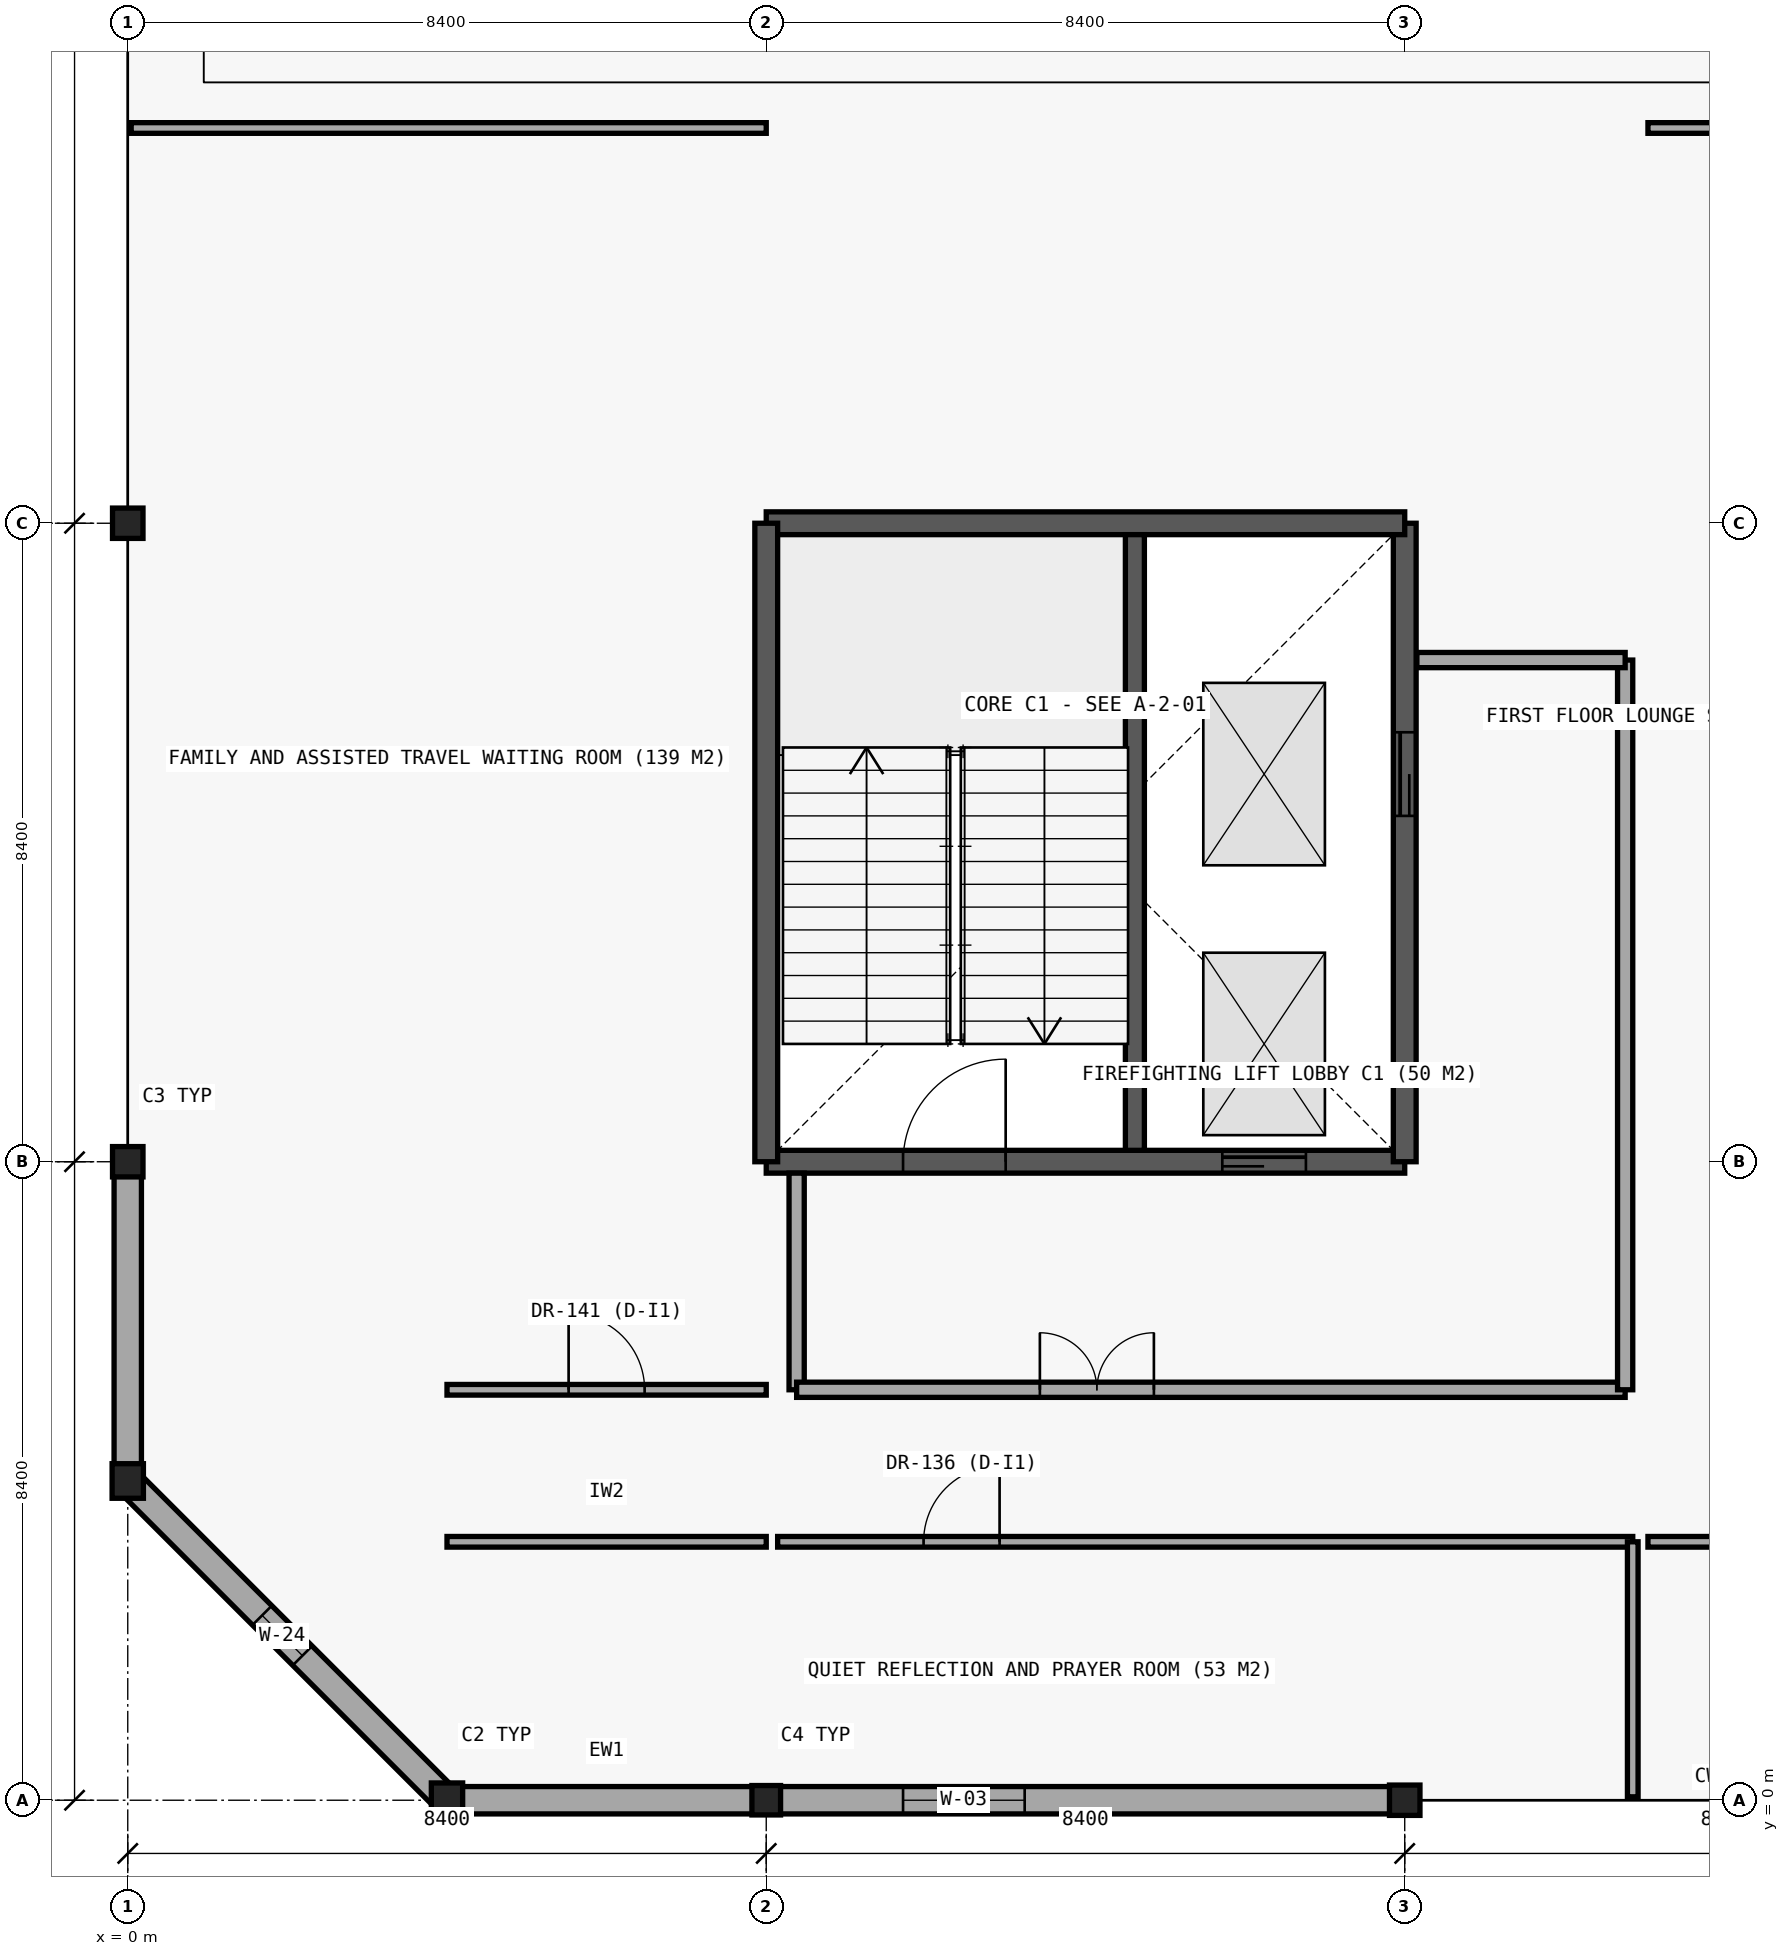
"""IFC4 building model, lengths in metres.
Left out: names, types, materials, properties, quantities, classifications, styles, units other than length and angle.
Written with IfcOpenShell. Run it as: python <this file> out.ifc"""

import sys

from ifc_helpers import new_model, si_unit, direction, frame, frame_2d, origin, origin_2d, place, context, subcontext, project, spatial, rectangle, i_section, extrude, element, fill, save


model = new_model("IFC4")
c1 = context("Model", 3, precision=1e-05, world=origin(), true_north=direction((0.0, 1.0)))
c2 = subcontext(c1, "Body", "Model", "MODEL_VIEW")
j1 = project(units=[si_unit("LENGTHUNIT", "METRE"), si_unit("PLANEANGLEUNIT", "RADIAN")], contexts=[c1])
p1 = place(None, origin())
s1 = spatial("IfcSite", under=j1, at=p1, CompositionType="ELEMENT")
p2 = place(p1, origin())
s2 = spatial("IfcBuilding", under=s1, at=p2, CompositionType="ELEMENT")
p3 = place(p2, frame((0.0, 0.0, 4.8)))
s3 = spatial("IfcBuildingStorey", under=s2, at=p3, CompositionType="ELEMENT", Elevation=4.8)
p4 = place(p3, frame((8.4, 8.4, 0.0), z_axis=(0.0, 0.0, 1.0), x_axis=(1.0, 0.0, 0.0)))
e1 = element("IfcWall", 1, at=p4, inside=s3, PredefinedType="SHEAR", context=c2, shape_type="SweptSolid", body=[
    extrude(rectangle(XDim=8.4, YDim=0.3, at=frame_2d((4.2, 0.0))), origin(), (0.0, 0.0, 1.0), 4.2),
])
p5 = place(p4, frame((1.8, 0.0, 0.0)))
e2 = element("IfcOpeningElement", 2, at=p5, cuts=e1, PredefinedType="OPENING", context=c2, shape_type="SweptSolid", body=[
    extrude(rectangle(XDim=1.35, YDim=2.2, at=frame_2d((0.675, 1.1))), frame((0.0, 0.16, 0.0), z_axis=(0.0, -1.0, 0.0), x_axis=(1.0, 0.0, 0.0)), (0.0, 0.0, 1.0), 0.32),
])
p6 = place(p4, frame((6.0, 0.0, 0.0)))
e3 = element("IfcOpeningElement", 3, at=p6, cuts=e1, PredefinedType="OPENING", context=c2, shape_type="SweptSolid", body=[
    extrude(rectangle(XDim=1.1, YDim=2.2, at=frame_2d((0.55, 1.1))), frame((0.0, 0.16, 0.0), z_axis=(0.0, -1.0, 0.0), x_axis=(1.0, 0.0, 0.0)), (0.0, 0.0, 1.0), 0.32),
])
p7 = place(p3, frame((16.8, 8.4, 0.0), z_axis=(0.0, 0.0, 1.0), x_axis=(0.0, 1.0, 0.0)))
e4 = element("IfcWall", 4, at=p7, inside=s3, PredefinedType="SHEAR", context=c2, shape_type="SweptSolid", body=[
    extrude(rectangle(XDim=8.4, YDim=0.3, at=frame_2d((4.2, 0.0))), origin(), (0.0, 0.0, 1.0), 4.2),
])
p8 = place(p7, frame((4.55, 0.0, 0.0)))
e5 = element("IfcOpeningElement", 5, at=p8, cuts=e4, PredefinedType="OPENING", context=c2, shape_type="SweptSolid", body=[
    extrude(rectangle(XDim=1.1, YDim=2.2, at=frame_2d((0.55, 1.1))), frame((0.0, 0.16, 0.0), z_axis=(0.0, -1.0, 0.0), x_axis=(1.0, 0.0, 0.0)), (0.0, 0.0, 1.0), 0.32),
])
for number, where, z_axis, x_axis in (
    (6, (16.8, 16.8, 0.0), (0.0, 0.0, 1.0), (-1.0, 0.0, 0.0)),
    (7, (8.4, 16.8, 0.0), (0.0, 0.0, 1.0), (0.0, -1.0, 0.0)),
):
    element("IfcWall", number, at=place(p3, frame(where, z_axis=z_axis, x_axis=x_axis)), inside=s3, PredefinedType="SHEAR", context=c2, shape_type="SweptSolid", body=[
        extrude(rectangle(XDim=8.4, YDim=0.3, at=frame_2d((4.2, 0.0))), origin(), (0.0, 0.0, 1.0), 4.2),
    ])
p9 = place(p3, frame((13.25, 8.55, 0.0), z_axis=(0.0, 0.0, 1.0), x_axis=(0.0, 1.0, 0.0)))
e8 = element("IfcWall", 8, at=p9, inside=s3, PredefinedType="SHEAR", context=c2, shape_type="SweptSolid", body=[
    extrude(rectangle(XDim=8.1, YDim=0.25, at=frame_2d((4.05, 0.0))), origin(), (0.0, 0.0, 1.0), 4.2),
])
for number, where, z_axis, x_axis in (
    (9, (0.0, 8.4, 0.0), (0.0, 0.0, 1.0), (1.0, 0.0, 0.0)),
    (10, (0.0, 16.8, 0.0), (0.0, 0.0, 1.0), (1.0, 0.0, 0.0)),
):
    element("IfcColumn", number, at=place(p3, frame(where, z_axis=z_axis, x_axis=x_axis)), inside=s3, PredefinedType="COLUMN", context=c2, shape_type="SweptSolid", body=[
        extrude(i_section(OverallWidth=0.401, OverallDepth=0.399, WebThickness=0.025, FlangeThickness=0.04, FilletRadius=0.015, at=origin_2d()), origin(), (0.0, 0.0, 1.0), 4.2),
    ])
p10 = place(p3, frame((8.4, 0.0, 0.0), z_axis=(0.0, 0.0, 1.0), x_axis=(1.0, 0.0, 0.0)))
e11 = element("IfcColumn", 11, at=p10, inside=s3, PredefinedType="COLUMN", context=c2, shape_type="SweptSolid", body=[
    extrude(i_section(OverallWidth=0.377, OverallDepth=0.387, WebThickness=0.022, FlangeThickness=0.036, FilletRadius=0.015, at=origin_2d()), origin(), (0.0, 0.0, 1.0), 4.2),
])
p11 = place(p3, frame((16.8, 0.0, 0.0), z_axis=(0.0, 0.0, 1.0), x_axis=(1.0, 0.0, 0.0)))
e12 = element("IfcColumn", 12, at=p11, inside=s3, PredefinedType="COLUMN", context=c2, shape_type="SweptSolid", body=[
    extrude(i_section(OverallWidth=0.401, OverallDepth=0.399, WebThickness=0.025, FlangeThickness=0.04, FilletRadius=0.015, at=origin_2d()), origin(), (0.0, 0.0, 1.0), 4.2),
])
for number, where, z_axis, x_axis in (
    (13, (4.2, 0.0, 0.0), (0.0, 0.0, 1.0), (1.0, 0.0, 0.0)),
    (14, (0.0, 4.2, 0.0), (0.0, 0.0, 1.0), (1.0, 0.0, 0.0)),
):
    element("IfcColumn", number, at=place(p3, frame(where, z_axis=z_axis, x_axis=x_axis)), inside=s3, PredefinedType="COLUMN", context=c2, shape_type="SweptSolid", body=[
        extrude(i_section(OverallWidth=0.412, OverallDepth=0.455, WebThickness=0.031, FlangeThickness=0.049, FilletRadius=0.015, at=origin_2d()), origin(), (0.0, 0.0, 1.0), 4.2),
    ])
p12 = place(p3, frame((4.2, 0.0, 0.0), z_axis=(0.0, 0.0, 1.0), x_axis=(1.0, 0.0, 0.0)))
e15 = element("IfcWall", 15, at=p12, inside=s3, PredefinedType="STANDARD", context=c2, shape_type="SweptSolid", body=[
    extrude(rectangle(XDim=4.2, YDim=0.36, at=frame_2d((2.1, 0.0))), origin(), (0.0, 0.0, 1.0), 3.62),
])
p13 = place(p3, frame((8.4, 0.0, 0.0), z_axis=(0.0, 0.0, 1.0), x_axis=(1.0, 0.0, 0.0)))
e16 = element("IfcWall", 16, at=p13, inside=s3, PredefinedType="STANDARD", context=c2, shape_type="SweptSolid", body=[
    extrude(rectangle(XDim=8.4, YDim=0.36, at=frame_2d((4.2, 0.0))), origin(), (0.0, 0.0, 1.0), 3.62),
])
p14 = place(p13, frame((1.8, 0.0, 0.85)))
e17 = element("IfcOpeningElement", 17, at=p14, cuts=e16, PredefinedType="OPENING", context=c2, shape_type="SweptSolid", body=[
    extrude(rectangle(XDim=1.6, YDim=2.5, at=frame_2d((0.8, 1.25))), frame((0.0, 0.19, 0.0), z_axis=(0.0, -1.0, 0.0), x_axis=(1.0, 0.0, 0.0)), (0.0, 0.0, 1.0), 0.38),
])
p15 = place(p3, frame((0.0, 8.4, 0.0), z_axis=(0.0, 0.0, 1.0), x_axis=(0.0, -1.0, 0.0)))
e18 = element("IfcWall", 18, at=p15, inside=s3, PredefinedType="STANDARD", context=c2, shape_type="SweptSolid", body=[
    extrude(rectangle(XDim=4.2, YDim=0.36, at=frame_2d((2.1, 0.0))), origin(), (0.0, 0.0, 1.0), 3.62),
])
p16 = place(p3, frame((0.0, 4.2, 0.0), z_axis=(0.0, 0.0, 1.0), x_axis=(0.707106781187, -0.707106781187, 0.0)))
e19 = element("IfcWall", 19, at=p16, inside=s3, PredefinedType="STANDARD", context=c2, shape_type="SweptSolid", body=[
    extrude(rectangle(XDim=5.94, YDim=0.36, at=frame_2d((2.97, 0.0))), origin(), (0.0, 0.0, 1.0), 3.62),
])
p17 = place(p16, frame((2.5, 0.0, 1.0)))
e20 = element("IfcOpeningElement", 20, at=p17, cuts=e19, PredefinedType="OPENING", context=c2, shape_type="SweptSolid", body=[
    extrude(rectangle(XDim=0.75, YDim=1.5, at=frame_2d((0.375, 0.75))), frame((0.0, 0.19, 0.0), z_axis=(0.0, -1.0, 0.0), x_axis=(1.0, 0.0, 0.0)), (0.0, 0.0, 1.0), 0.38),
])
p18 = place(p3, frame((8.8, 5.4, 0.0), z_axis=(0.0, 0.0, 1.0), x_axis=(0.0, 1.0, 0.0)))
e21 = element("IfcWall", 21, at=p18, inside=s3, PredefinedType="PARTITIONING", context=c2, shape_type="SweptSolid", body=[
    extrude(rectangle(XDim=2.85, YDim=0.2, at=frame_2d((1.425, 0.0))), origin(), (0.0, 0.0, 1.0), 3.52),
])
p19 = place(p3, frame((8.8, 5.4, 0.0), z_axis=(0.0, 0.0, 1.0), x_axis=(1.0, 0.0, 0.0)))
e22 = element("IfcWall", 22, at=p19, inside=s3, PredefinedType="PARTITIONING", context=c2, shape_type="SweptSolid", body=[
    extrude(rectangle(XDim=10.9, YDim=0.2, at=frame_2d((5.45, 0.0))), origin(), (0.0, 0.0, 1.0), 3.52),
])
p20 = place(p19, frame((3.2, 0.0, 0.0)))
e23 = element("IfcOpeningElement", 23, at=p20, cuts=e22, PredefinedType="OPENING", context=c2, shape_type="SweptSolid", body=[
    extrude(rectangle(XDim=1.5, YDim=2.2, at=frame_2d((0.75, 1.1))), frame((0.0, 0.11, 0.0), z_axis=(0.0, -1.0, 0.0), x_axis=(1.0, 0.0, 0.0)), (0.0, 0.0, 1.0), 0.22),
])
p21 = place(p3, frame((19.7, 5.4, 0.0), z_axis=(0.0, 0.0, 1.0), x_axis=(0.0, 1.0, 0.0)))
e24 = element("IfcWall", 24, at=p21, inside=s3, PredefinedType="PARTITIONING", context=c2, shape_type="SweptSolid", body=[
    extrude(rectangle(XDim=9.6, YDim=0.2, at=frame_2d((4.8, 0.0))), origin(), (0.0, 0.0, 1.0), 3.52),
])
p22 = place(p3, frame((16.96, 15.0, 0.0), z_axis=(0.0, 0.0, 1.0), x_axis=(1.0, 0.0, 0.0)))
e25 = element("IfcWall", 25, at=p22, inside=s3, PredefinedType="PARTITIONING", context=c2, shape_type="SweptSolid", body=[
    extrude(rectangle(XDim=2.74, YDim=0.2, at=frame_2d((1.37, 0.0))), origin(), (0.0, 0.0, 1.0), 3.52),
])
p23 = place(p3, frame((4.2, 3.4, 0.0), z_axis=(0.0, 0.0, 1.0), x_axis=(1.0, 0.0, 0.0)))
e26 = element("IfcWall", 26, at=p23, inside=s3, PredefinedType="PARTITIONING", context=c2, shape_type="SweptSolid", body=[
    extrude(rectangle(XDim=4.2, YDim=0.14, at=frame_2d((2.1, 0.0))), origin(), (0.0, 0.0, 1.0), 3.5),
])
p24 = place(p3, frame((8.55, 3.4, 0.0), z_axis=(0.0, 0.0, 1.0), x_axis=(1.0, 0.0, 0.0)))
e27 = element("IfcWall", 27, at=p24, inside=s3, PredefinedType="PARTITIONING", context=c2, shape_type="SweptSolid", body=[
    extrude(rectangle(XDim=11.25, YDim=0.14, at=frame_2d((5.625, 0.0))), origin(), (0.0, 0.0, 1.0), 3.5),
])
p25 = place(p24, frame((1.92, 0.0, 0.0)))
e28 = element("IfcOpeningElement", 28, at=p25, cuts=e27, PredefinedType="OPENING", context=c2, shape_type="SweptSolid", body=[
    extrude(rectangle(XDim=1.0, YDim=2.15, at=frame_2d((0.5, 1.075))), frame((0.0, 0.08, 0.0), z_axis=(0.0, -1.0, 0.0), x_axis=(1.0, 0.0, 0.0)), (0.0, 0.0, 1.0), 0.16),
])
p26 = place(p3, frame((20.0, 3.4, 0.0), z_axis=(0.0, 0.0, 1.0), x_axis=(1.0, 0.0, 0.0)))
e29 = element("IfcWall", 29, at=p26, inside=s3, PredefinedType="PARTITIONING", context=c2, shape_type="SweptSolid", body=[
    extrude(rectangle(XDim=13.6, YDim=0.14, at=frame_2d((6.8, 0.0))), origin(), (0.0, 0.0, 1.0), 3.5),
])
p27 = place(p26, frame((7.52, 0.0, 0.0)))
e30 = element("IfcOpeningElement", 30, at=p27, cuts=e29, PredefinedType="OPENING", context=c2, shape_type="SweptSolid", body=[
    extrude(rectangle(XDim=1.0, YDim=2.15, at=frame_2d((0.5, 1.075))), frame((0.0, 0.08, 0.0), z_axis=(0.0, -1.0, 0.0), x_axis=(1.0, 0.0, 0.0)), (0.0, 0.0, 1.0), 0.16),
])
p28 = place(p3, frame((4.2, 5.4, 0.0), z_axis=(0.0, 0.0, 1.0), x_axis=(1.0, 0.0, 0.0)))
e31 = element("IfcWall", 31, at=p28, inside=s3, PredefinedType="PARTITIONING", context=c2, shape_type="SweptSolid", body=[
    extrude(rectangle(XDim=4.2, YDim=0.14, at=frame_2d((2.1, 0.0))), origin(), (0.0, 0.0, 1.0), 3.5),
])
p29 = place(p28, frame((1.6, 0.0, 0.0)))
e32 = element("IfcOpeningElement", 32, at=p29, cuts=e31, PredefinedType="OPENING", context=c2, shape_type="SweptSolid", body=[
    extrude(rectangle(XDim=1.0, YDim=2.15, at=frame_2d((0.5, 1.075))), frame((0.0, 0.08, 0.0), z_axis=(0.0, -1.0, 0.0), x_axis=(1.0, 0.0, 0.0)), (0.0, 0.0, 1.0), 0.16),
])
p30 = place(p3, frame((0.045, 22.0, 0.0), z_axis=(0.0, 0.0, 1.0), x_axis=(1.0, 0.0, 0.0)))
e33 = element("IfcWall", 33, at=p30, inside=s3, PredefinedType="PARTITIONING", context=c2, shape_type="SweptSolid", body=[
    extrude(rectangle(XDim=8.355, YDim=0.14, at=frame_2d((4.177, 0.0))), origin(), (0.0, 0.0, 1.0), 3.5),
])
p31 = place(p3, frame((20.0, 22.0, 0.0), z_axis=(0.0, 0.0, 1.0), x_axis=(1.0, 0.0, 0.0)))
e34 = element("IfcWall", 34, at=p31, inside=s3, PredefinedType="PARTITIONING", context=c2, shape_type="SweptSolid", body=[
    extrude(rectangle(XDim=2.2, YDim=0.14, at=frame_2d((1.1, 0.0))), origin(), (0.0, 0.0, 1.0), 3.5),
])
p32 = place(p3, frame((19.8, 0.045, 0.0), z_axis=(0.0, 0.0, 1.0), x_axis=(0.0, 1.0, 0.0)))
e35 = element("IfcWall", 35, at=p32, inside=s3, PredefinedType="PARTITIONING", context=c2, shape_type="SweptSolid", body=[
    extrude(rectangle(XDim=3.355, YDim=0.14, at=frame_2d((1.677, 0.0))), origin(), (0.0, 0.0, 1.0), 3.5),
])
p33 = place(p14, origin())
e36 = element("IfcWindow", 36, at=p33, inside=s3, PartitioningType="SINGLE_PANEL", PredefinedType="WINDOW", context=c2, shape_type="SweptSolid", body=[
    extrude(rectangle(XDim=1.6, YDim=2.5, at=frame_2d((0.8, 1.25))), frame((0.0, 0.03, 0.0), z_axis=(0.0, -1.0, 0.0), x_axis=(1.0, 0.0, 0.0)), (0.0, 0.0, 1.0), 0.06),
])
fill(e17, e36)
p34 = place(p17, origin())
e37 = element("IfcWindow", 37, at=p34, inside=s3, PartitioningType="SINGLE_PANEL", PredefinedType="WINDOW", context=c2, shape_type="SweptSolid", body=[
    extrude(rectangle(XDim=0.75, YDim=1.5, at=frame_2d((0.375, 0.75))), frame((0.0, 0.03, 0.0), z_axis=(0.0, -1.0, 0.0), x_axis=(1.0, 0.0, 0.0)), (0.0, 0.0, 1.0), 0.06),
])
fill(e20, e37)
p35 = place(p5, origin())
e38 = element("IfcDoor", 38, at=p35, inside=s3, OperationType="SINGLE_SWING_RIGHT", PredefinedType="DOOR", context=c2, shape_type="SweptSolid", body=[
    extrude(rectangle(XDim=1.35, YDim=2.2, at=frame_2d((0.675, 1.1))), frame((0.0, 0.025, 0.0), z_axis=(0.0, -1.0, 0.0), x_axis=(1.0, 0.0, 0.0)), (0.0, 0.0, 1.0), 0.05),
])
fill(e2, e38)
p36 = place(p6, origin())
e39 = element("IfcDoor", 39, at=p36, inside=s3, OperationType="SLIDING_TO_LEFT", PredefinedType="DOOR", context=c2, shape_type="SweptSolid", body=[
    extrude(rectangle(XDim=1.1, YDim=2.2, at=frame_2d((0.55, 1.1))), frame((0.0, 0.025, 0.0), z_axis=(0.0, -1.0, 0.0), x_axis=(1.0, 0.0, 0.0)), (0.0, 0.0, 1.0), 0.05),
])
fill(e3, e39)
p37 = place(p8, origin())
e40 = element("IfcDoor", 40, at=p37, inside=s3, OperationType="SLIDING_TO_RIGHT", PredefinedType="DOOR", context=c2, shape_type="SweptSolid", body=[
    extrude(rectangle(XDim=1.1, YDim=2.2, at=frame_2d((0.55, 1.1))), frame((0.0, 0.025, 0.0), z_axis=(0.0, -1.0, 0.0), x_axis=(1.0, 0.0, 0.0)), (0.0, 0.0, 1.0), 0.05),
])
fill(e5, e40)
p38 = place(p20, origin())
e41 = element("IfcDoor", 41, at=p38, inside=s3, OperationType="DOUBLE_DOOR_SINGLE_SWING", PredefinedType="DOOR", context=c2, shape_type="SweptSolid", body=[
    extrude(rectangle(XDim=1.5, YDim=2.2, at=frame_2d((0.75, 1.1))), frame((0.0, 0.025, 0.0), z_axis=(0.0, -1.0, 0.0), x_axis=(1.0, 0.0, 0.0)), (0.0, 0.0, 1.0), 0.05),
])
fill(e23, e41)
p39 = place(p25, origin())
e42 = element("IfcDoor", 42, at=p39, inside=s3, OperationType="SINGLE_SWING_RIGHT", PredefinedType="DOOR", context=c2, shape_type="SweptSolid", body=[
    extrude(rectangle(XDim=1.0, YDim=2.15, at=frame_2d((0.5, 1.075))), frame((0.0, 0.025, 0.0), z_axis=(0.0, -1.0, 0.0), x_axis=(1.0, 0.0, 0.0)), (0.0, 0.0, 1.0), 0.05),
])
fill(e28, e42)
p40 = place(p29, origin())
e43 = element("IfcDoor", 43, at=p40, inside=s3, OperationType="SINGLE_SWING_LEFT", PredefinedType="DOOR", context=c2, shape_type="SweptSolid", body=[
    extrude(rectangle(XDim=1.0, YDim=2.15, at=frame_2d((0.5, 1.075))), frame((0.0, 0.025, 0.0), z_axis=(0.0, -1.0, 0.0), x_axis=(1.0, 0.0, 0.0)), (0.0, 0.0, 1.0), 0.05),
])
fill(e32, e43)
save(model, sys.argv[1])
